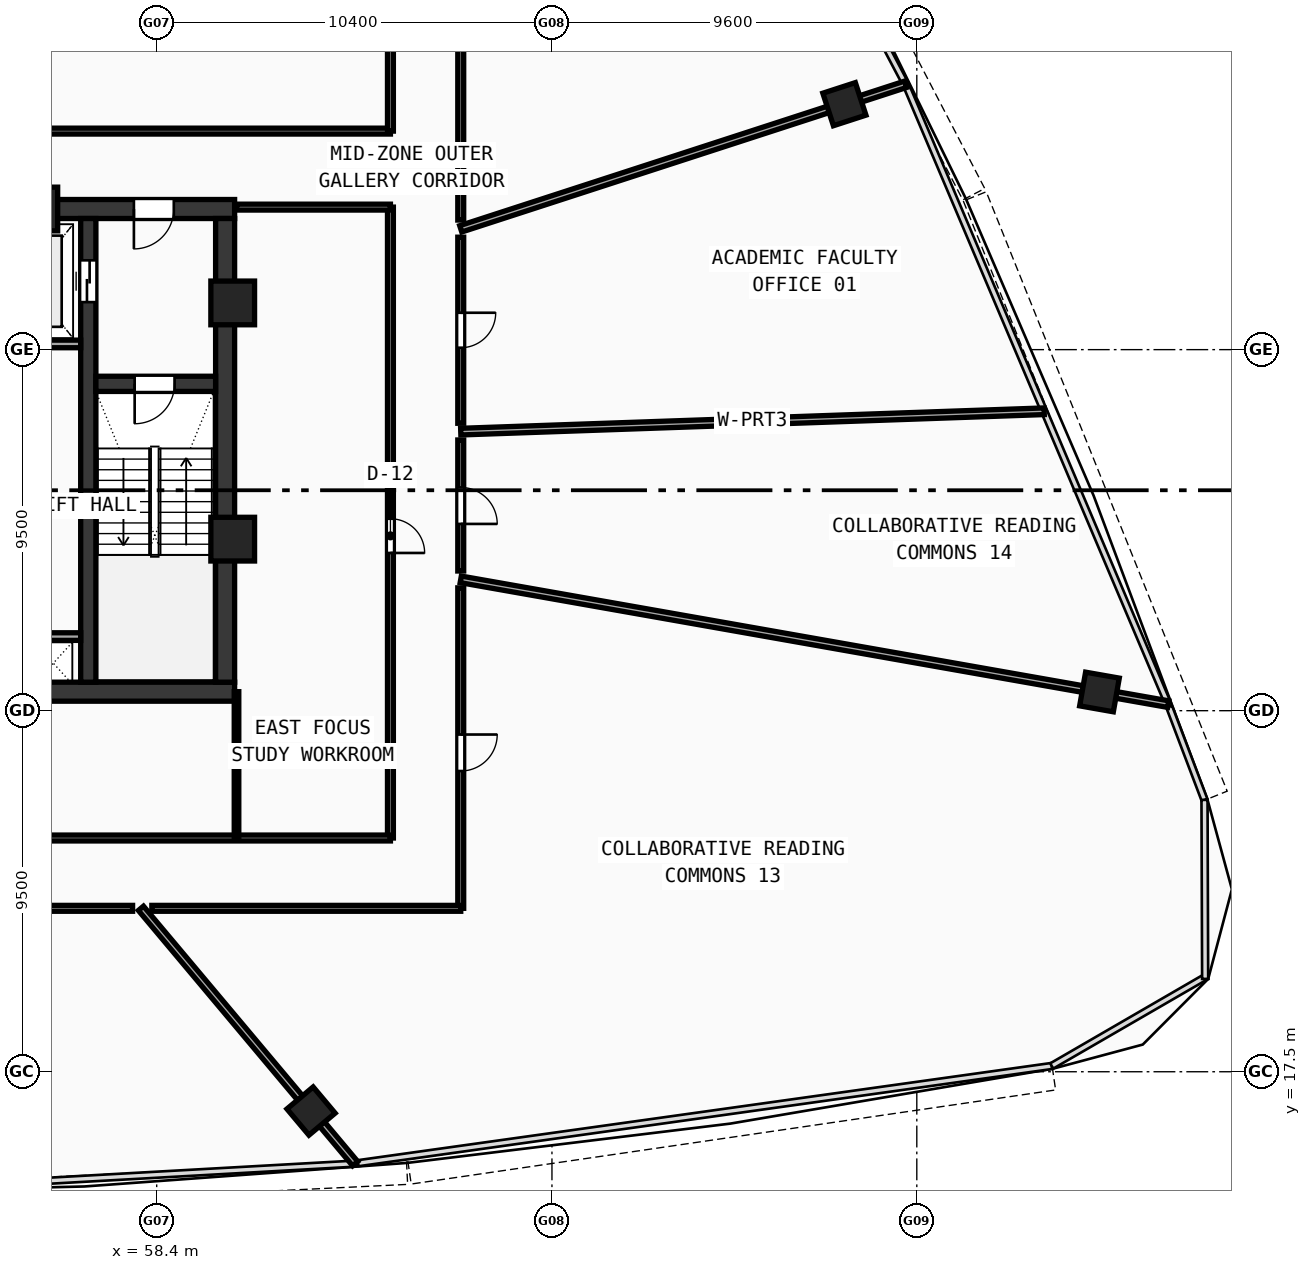
"""IFC4 building model, lengths in metres.
Left out: names, types, materials, properties, quantities, classifications, styles, units other than length and angle.
Written with IfcOpenShell. Run it as: python <this file> out.ifc"""

import sys

from ifc_helpers import new_model, si_unit, direction, frame, frame_2d, origin, origin_with_axes, origin_2d, place, context, subcontext, project, spatial, rectangle, hollow_rectangle, extrude, source, transform, mapped, element, fill, save


model = new_model("IFC4")
c1 = context("Model", 3, precision=1e-05, world=origin(), true_north=direction((0.0, 1.0)))
c2 = subcontext(c1, "Body", "Model", "MODEL_VIEW")
j1 = project(units=[si_unit("LENGTHUNIT", "METRE"), si_unit("PLANEANGLEUNIT", "RADIAN")], contexts=[c1])
p1 = place(None, origin())
s1 = spatial("IfcSite", under=j1, at=p1, CompositionType="ELEMENT")
p2 = place(p1, origin())
s2 = spatial("IfcBuilding", under=s1, at=p2, CompositionType="ELEMENT")
p3 = place(p2, frame((0.0, 0.0, 203.76)))
s3 = spatial("IfcBuildingStorey", under=s2, at=p3, CompositionType="ELEMENT", Elevation=203.76)
p4 = place(p3, frame((35.55, 27.5, 0.0), z_axis=(0.0, 0.0, 1.0), x_axis=(1.0, 0.0, 0.0)))
e1 = element("IfcWall", 1, at=p4, inside=s3, PredefinedType="SHEAR", context=c2, shape_type="SweptSolid", body=[
    extrude(rectangle(XDim=24.9, YDim=0.5, at=frame_2d((12.45, 0.0))), origin(), (0.0, 0.0, 1.0), 3.54),
])
p5 = place(p3, frame((49.2, 40.2, 0.0), z_axis=(0.0, 0.0, 1.0), x_axis=(1.0, 0.0, 0.0)))
e2 = element("IfcWall", 2, at=p5, inside=s3, PredefinedType="SHEAR", context=c2, shape_type="SweptSolid", body=[
    extrude(rectangle(XDim=11.25, YDim=0.5, at=frame_2d((5.625, 0.0))), origin(), (0.0, 0.0, 1.0), 3.54),
])
p6 = place(p5, frame((8.6, 0.0, 0.0)))
e3 = element("IfcOpeningElement", 3, at=p6, cuts=e2, PredefinedType="OPENING", context=c2, shape_type="SweptSolid", body=[
    extrude(rectangle(XDim=1.05, YDim=2.1, at=frame_2d((0.525, 1.05))), frame((0.0, 0.26, 0.0), z_axis=(0.0, -1.0, 0.0), x_axis=(1.0, 0.0, 0.0)), (0.0, 0.0, 1.0), 0.52),
])
p7 = place(p3, frame((60.2, 27.75, 0.0), z_axis=(0.0, 0.0, 1.0), x_axis=(0.0, 1.0, 0.0)))
e4 = element("IfcWall", 4, at=p7, inside=s3, PredefinedType="SHEAR", context=c2, shape_type="SweptSolid", body=[
    extrude(rectangle(XDim=12.2, YDim=0.5, at=frame_2d((6.1, 0.0))), origin(), (0.0, 0.0, 1.0), 3.54),
])
p8 = place(p3, frame((56.6, 27.75, 0.0), z_axis=(0.0, 0.0, 1.0), x_axis=(0.0, 1.0, 0.0)))
e5 = element("IfcWall", 5, at=p8, inside=s3, PredefinedType="SHEAR", context=c2, shape_type="SweptSolid", body=[
    extrude(rectangle(XDim=12.2, YDim=0.4, at=frame_2d((6.1, 0.0))), origin(), (0.0, 0.0, 1.0), 3.54),
])
p9 = place(p8, frame((10.0, 0.0, 0.0)))
e6 = element("IfcOpeningElement", 6, at=p9, cuts=e5, PredefinedType="OPENING", context=c2, shape_type="SweptSolid", body=[
    extrude(rectangle(XDim=1.1, YDim=2.1, at=frame_2d((0.55, 1.05))), frame((0.0, 0.21, 0.0), z_axis=(0.0, -1.0, 0.0), x_axis=(1.0, 0.0, 0.0)), (0.0, 0.0, 1.0), 0.42),
])
p10 = place(p3, frame((56.8, 35.6, 0.0), z_axis=(0.0, 0.0, 1.0), x_axis=(1.0, 0.0, 0.0)))
e7 = element("IfcWall", 7, at=p10, inside=s3, PredefinedType="SHEAR", context=c2, shape_type="SweptSolid", body=[
    extrude(rectangle(XDim=3.15, YDim=0.4, at=frame_2d((1.575, 0.0))), origin(), (0.0, 0.0, 1.0), 3.54),
])
p11 = place(p10, frame((1.02, 0.0, 0.0)))
e8 = element("IfcOpeningElement", 8, at=p11, cuts=e7, PredefinedType="OPENING", context=c2, shape_type="SweptSolid", body=[
    extrude(rectangle(XDim=1.05, YDim=2.1, at=frame_2d((0.525, 1.05))), frame((0.0, 0.21, 0.0), z_axis=(0.0, -1.0, 0.0), x_axis=(1.0, 0.0, 0.0)), (0.0, 0.0, 1.0), 0.42),
])
m1 = source(origin(), c2, "Body", "SweptSolid", [
    extrude(hollow_rectangle(XDim=1.15, YDim=1.15, WallThickness=0.048, at=origin_2d()), origin(), (0.0, 0.0, 1.0), 3.8),
])
for number, where, z_axis, x_axis in (
    (9, (60.4, 31.513, -0.26), (0.0, 0.0, 1.0), (1.0, 0.0, 0.0)),
    (10, (60.4, 37.729, -0.26), (0.0, 0.0, 1.0), (1.0, 0.0, 0.0)),
    (11, (55.219, 40.2, -0.26), (0.0, 0.0, 1.0), (1.0, 0.0, 0.0)),
):
    element("IfcColumn", number, at=place(p3, frame(where, z_axis=z_axis, x_axis=x_axis)), inside=s3, PredefinedType="COLUMN", context=c2, shape_type="MappedRepresentation", body=[
        mapped(m1, transform((0.0, 0.0, 0.0), scale=1.0)),
    ])
m2 = source(origin(), c2, "Body", "SweptSolid", [
    extrude(hollow_rectangle(XDim=0.9, YDim=0.9, WallThickness=0.036, at=origin_2d()), origin(), (0.0, 0.0, 1.0), 3.8),
])
for number, where, z_axis, x_axis in (
    (12, (62.461, 16.466, -0.26), (0.0, 0.0, 1.0), (0.766, 0.643, 0.0)),
    (13, (83.207, 27.492, -0.26), (0.0, 0.0, 1.0), (0.174, 0.985, 0.0)),
    (14, (76.495, 42.958, -0.26), (0.0, 0.0, 1.0), (-0.309, 0.951, 0.0)),
):
    element("IfcColumn", number, at=place(p3, frame(where, z_axis=z_axis, x_axis=x_axis)), inside=s3, PredefinedType="COLUMN", context=c2, shape_type="MappedRepresentation", body=[
        mapped(m2, transform((0.0, 0.0, 0.0), scale=1.0)),
    ])
p12 = place(p3, frame((53.68, 36.65, 0.0), z_axis=(0.0, 0.0, 1.0), x_axis=(1.0, 0.0, 0.0)))
e15 = element("IfcWall", 15, at=p12, inside=s3, PredefinedType="SOLIDWALL", context=c2, shape_type="SweptSolid", body=[
    extrude(rectangle(XDim=2.72, YDim=0.2, at=frame_2d((1.36, 0.0))), origin(), (0.0, 0.0, 1.0), 3.54),
])
p13 = place(p3, frame((55.12, 28.95, 0.0), z_axis=(0.0, 0.0, 1.0), x_axis=(1.0, 0.0, 0.0)))
e16 = element("IfcWall", 16, at=p13, inside=s3, PredefinedType="SOLIDWALL", context=c2, shape_type="SweptSolid", body=[
    extrude(rectangle(XDim=1.28, YDim=0.2, at=frame_2d((0.64, 0.0))), origin(), (0.0, 0.0, 1.0), 3.54),
])
p14 = place(p3, frame((31.45, 42.25, 0.0), z_axis=(0.0, 0.0, 1.0), x_axis=(1.0, 0.0, 0.0)))
e17 = element("IfcWall", 17, at=p14, inside=s3, PredefinedType="PARTITIONING", context=c2, shape_type="SweptSolid", body=[
    extrude(rectangle(XDim=33.1, YDim=0.155, at=frame_2d((16.55, 0.0))), origin(), (0.0, 0.0, 1.0), 2.89),
])
p15 = place(p3, frame((64.55, 42.25, 0.0), z_axis=(0.0, 0.0, 1.0), x_axis=(0.0, 1.0, 0.0)))
e18 = element("IfcWall", 18, at=p15, inside=s3, PredefinedType="PARTITIONING", context=c2, shape_type="SweptSolid", body=[
    extrude(rectangle(XDim=11.7, YDim=0.155, at=frame_2d((5.85, 0.0))), origin(), (0.0, 0.0, 1.0), 2.89),
])
p16 = place(p3, frame((64.55, 23.65, 0.0), z_axis=(0.0, 0.0, 1.0), x_axis=(0.0, 1.0, 0.0)))
e19 = element("IfcWall", 19, at=p16, inside=s3, PredefinedType="PARTITIONING", context=c2, shape_type="SweptSolid", body=[
    extrude(rectangle(XDim=16.6, YDim=0.155, at=frame_2d((8.3, 0.0))), origin(), (0.0, 0.0, 1.0), 2.89),
])
p17 = place(p16, frame((7.5, 0.0, 0.0)))
e20 = element("IfcOpeningElement", 20, at=p17, cuts=e19, PredefinedType="OPENING", context=c2, shape_type="SweptSolid", body=[
    extrude(rectangle(XDim=0.9, YDim=2.08, at=frame_2d((0.45, 1.04))), frame((0.0, 0.087, 0.0), z_axis=(0.0, -1.0, 0.0), x_axis=(1.0, 0.0, 0.0)), (0.0, 0.0, 1.0), 0.175),
])
p18 = place(p3, frame((31.45, 23.65, 0.0), z_axis=(0.0, 0.0, 1.0), x_axis=(1.0, 0.0, 0.0)))
e21 = element("IfcWall", 21, at=p18, inside=s3, PredefinedType="PARTITIONING", context=c2, shape_type="SweptSolid", body=[
    extrude(rectangle(XDim=33.1, YDim=0.155, at=frame_2d((16.55, 0.0))), origin(), (0.0, 0.0, 1.0), 2.89),
])
p19 = place(p18, frame((16.0, 0.0, 0.0)))
e22 = element("IfcOpeningElement", 22, at=p19, cuts=e21, PredefinedType="OPENING", context=c2, shape_type="SweptSolid", body=[
    extrude(rectangle(XDim=0.92, YDim=2.1, at=frame_2d((0.46, 1.05))), frame((0.0, 0.087, 0.0), z_axis=(0.0, -1.0, 0.0), x_axis=(1.0, 0.0, 0.0)), (0.0, 0.0, 1.0), 0.175),
])
p20 = place(p3, frame((60.5, 40.25, 0.0), z_axis=(0.0, 0.0, 1.0), x_axis=(1.0, 0.0, 0.0)))
e23 = element("IfcWall", 23, at=p20, inside=s3, PredefinedType="PARTITIONING", context=c2, shape_type="SweptSolid", body=[
    extrude(rectangle(XDim=4.05, YDim=0.155, at=frame_2d((2.025, 0.0))), origin(), (0.0, 0.0, 1.0), 3.54),
])
p21 = place(p3, frame((60.5, 23.65, 0.0), z_axis=(0.0, 0.0, 1.0), x_axis=(0.0, 1.0, 0.0)))
e24 = element("IfcWall", 24, at=p21, inside=s3, PredefinedType="PARTITIONING", context=c2, shape_type="SweptSolid", body=[
    extrude(rectangle(XDim=3.85, YDim=0.12, at=frame_2d((1.925, 0.0))), origin(), (0.0, 0.0, 1.0), 3.14),
])
p22 = place(p3, frame((66.4, 34.343, 0.0), z_axis=(0.0, 0.0, 1.0), x_axis=(0.999390706755, 0.034902940442, 0.0)))
e25 = element("IfcWall", 25, at=p22, inside=s3, PredefinedType="PARTITIONING", context=c2, shape_type="SweptSolid", body=[
    extrude(rectangle(XDim=15.361, YDim=0.175, at=frame_2d((7.68, 0.0))), origin(), (0.0, 0.0, 1.0), 2.89),
])
p23 = place(p3, frame((66.4, 39.678, 0.0), z_axis=(0.0, 0.0, 1.0), x_axis=(0.951057676857, 0.309013422511, 0.0)))
e26 = element("IfcWall", 26, at=p23, inside=s3, PredefinedType="PARTITIONING", context=c2, shape_type="SweptSolid", body=[
    extrude(rectangle(XDim=12.31, YDim=0.175, at=frame_2d((6.155, 0.0))), origin(), (0.0, 0.0, 1.0), 2.89),
])
p24 = place(p3, frame((57.985, 21.8, 0.0), z_axis=(0.0, 0.0, 1.0), x_axis=(0.642774108653, -0.766055771629, 0.0)))
e27 = element("IfcWall", 27, at=p24, inside=s3, PredefinedType="PARTITIONING", context=c2, shape_type="SweptSolid", body=[
    extrude(rectangle(XDim=8.769, YDim=0.175, at=frame_2d((4.385, 0.0))), origin(), (0.0, 0.0, 1.0), 2.89),
])
p25 = place(p3, frame((66.4, 30.456, 0.0), z_axis=(0.0, 0.0, 1.0), x_axis=(0.984807864876, -0.173647543254, 0.0)))
e28 = element("IfcWall", 28, at=p25, inside=s3, PredefinedType="PARTITIONING", context=c2, shape_type="SweptSolid", body=[
    extrude(rectangle(XDim=18.902, YDim=0.175, at=frame_2d((9.451, 0.0))), origin(), (0.0, 0.0, 1.0), 2.89),
])
p26 = place(p3, frame((66.4, 55.8, 0.0), z_axis=(0.0, 0.0, 1.0), x_axis=(0.0, -1.0, 0.0)))
e29 = element("IfcWall", 29, at=p26, inside=s3, PredefinedType="PARTITIONING", context=c2, shape_type="SweptSolid", body=[
    extrude(rectangle(XDim=15.89, YDim=0.155, at=frame_2d((7.945, 0.0))), origin(), (0.0, 0.0, 1.0), 2.89),
])
p27 = place(p26, frame((7.356, 0.0, 0.0)))
e30 = element("IfcOpeningElement", 30, at=p27, cuts=e29, PredefinedType="OPENING", context=c2, shape_type="SweptSolid", body=[
    extrude(rectangle(XDim=0.96, YDim=2.12, at=frame_2d((0.48, 1.06))), frame((0.0, 0.087, 0.0), z_axis=(0.0, -1.0, 0.0), x_axis=(1.0, 0.0, 0.0)), (0.0, 0.0, 1.0), 0.175),
])
p28 = place(p3, frame((66.4, 39.459, 0.0), z_axis=(0.0, 0.0, 1.0), x_axis=(0.0, -1.0, 0.0)))
e31 = element("IfcWall", 31, at=p28, inside=s3, PredefinedType="PARTITIONING", context=c2, shape_type="SweptSolid", body=[
    extrude(rectangle(XDim=4.896, YDim=0.155, at=frame_2d((2.448, 0.0))), origin(), (0.0, 0.0, 1.0), 3.14),
])
p29 = place(p28, frame((1.988, 0.0, 0.0)))
e32 = element("IfcOpeningElement", 32, at=p29, cuts=e31, PredefinedType="OPENING", context=c2, shape_type="SweptSolid", body=[
    extrude(rectangle(XDim=0.92, YDim=2.1, at=frame_2d((0.46, 1.05))), frame((0.0, 0.087, 0.0), z_axis=(0.0, -1.0, 0.0), x_axis=(1.0, 0.0, 0.0)), (0.0, 0.0, 1.0), 0.175),
])
p30 = place(p3, frame((66.4, 34.123, 0.0), z_axis=(0.0, 0.0, 1.0), x_axis=(0.0, -1.0, 0.0)))
e33 = element("IfcWall", 33, at=p30, inside=s3, PredefinedType="PARTITIONING", context=c2, shape_type="SweptSolid", body=[
    extrude(rectangle(XDim=3.448, YDim=0.155, at=frame_2d((1.724, 0.0))), origin(), (0.0, 0.0, 1.0), 3.54),
])
p31 = place(p30, frame((1.249, 0.0, 0.0)))
e34 = element("IfcOpeningElement", 34, at=p31, cuts=e33, PredefinedType="OPENING", context=c2, shape_type="SweptSolid", body=[
    extrude(rectangle(XDim=0.96, YDim=2.12, at=frame_2d((0.48, 1.06))), frame((0.0, 0.087, 0.0), z_axis=(0.0, -1.0, 0.0), x_axis=(1.0, 0.0, 0.0)), (0.0, 0.0, 1.0), 0.175),
])
p32 = place(p3, frame((66.4, 30.232, 0.0), z_axis=(0.0, 0.0, 1.0), x_axis=(0.0, -1.0, 0.0)))
e35 = element("IfcWall", 35, at=p32, inside=s3, PredefinedType="PARTITIONING", context=c2, shape_type="SweptSolid", body=[
    extrude(rectangle(XDim=8.432, YDim=0.155, at=frame_2d((4.216, 0.0))), origin(), (0.0, 0.0, 1.0), 3.14),
])
p33 = place(p32, frame((3.859, 0.0, 0.0)))
e36 = element("IfcOpeningElement", 36, at=p33, cuts=e35, PredefinedType="OPENING", context=c2, shape_type="SweptSolid", body=[
    extrude(rectangle(XDim=0.96, YDim=2.12, at=frame_2d((0.48, 1.06))), frame((0.0, 0.087, 0.0), z_axis=(0.0, -1.0, 0.0), x_axis=(1.0, 0.0, 0.0)), (0.0, 0.0, 1.0), 0.175),
])
p34 = place(p3, frame((66.4, 21.8, 0.0), z_axis=(0.0, 0.0, 1.0), x_axis=(-1.0, 0.0, 0.0)))
e37 = element("IfcWall", 37, at=p34, inside=s3, PredefinedType="PARTITIONING", context=c2, shape_type="SweptSolid", body=[
    extrude(rectangle(XDim=8.127, YDim=0.155, at=frame_2d((4.064, 0.0))), origin(), (0.0, 0.0, 1.0), 3.14),
])
p35 = place(p3, frame((57.765, 21.8, 0.0), z_axis=(0.0, 0.0, 1.0), x_axis=(-1.0, 0.0, 0.0)))
e38 = element("IfcWall", 38, at=p35, inside=s3, PredefinedType="PARTITIONING", context=c2, shape_type="SweptSolid", body=[
    extrude(rectangle(XDim=12.734, YDim=0.155, at=frame_2d((6.367, 0.0))), origin(), (0.0, 0.0, 1.0), 2.89),
])
p36 = place(p35, frame((5.892, 0.0, 0.0)))
e39 = element("IfcOpeningElement", 39, at=p36, cuts=e38, PredefinedType="OPENING", context=c2, shape_type="SweptSolid", body=[
    extrude(rectangle(XDim=0.96, YDim=2.12, at=frame_2d((0.48, 1.06))), frame((0.0, 0.087, 0.0), z_axis=(0.0, -1.0, 0.0), x_axis=(1.0, 0.0, 0.0)), (0.0, 0.0, 1.0), 0.175),
])
m3 = source(origin(), c2, "Body", "SweptSolid", [
    extrude(rectangle(XDim=1.05, YDim=2.1, at=frame_2d((0.525, 1.05))), frame((0.0, 0.025, 0.0), z_axis=(0.0, -1.0, 0.0), x_axis=(1.0, 0.0, 0.0)), (0.0, 0.0, 1.0), 0.05),
])
p37 = place(p11, frame((1.05, 0.0, 0.0), z_axis=(0.0, 0.0, 1.0), x_axis=(-1.0, 0.0, 0.0)))
e40 = element("IfcDoor", 40, at=p37, inside=s3, OperationType="SINGLE_SWING_RIGHT", PredefinedType="DOOR", context=c2, shape_type="MappedRepresentation", body=[
    mapped(m3, transform((0.0, 0.0, 0.0), scale=1.0)),
])
fill(e8, e40)
p38 = place(p6, frame((1.05, 0.0, 0.0), z_axis=(0.0, 0.0, 1.0), x_axis=(-1.0, 0.0, 0.0)))
e41 = element("IfcDoor", 41, at=p38, inside=s3, OperationType="SINGLE_SWING_RIGHT", PredefinedType="DOOR", context=c2, shape_type="MappedRepresentation", body=[
    mapped(m3, transform((0.0, 0.0, 0.0), scale=1.0)),
])
fill(e3, e41)
m4 = source(origin(), c2, "Body", "SweptSolid", [
    extrude(rectangle(XDim=1.1, YDim=2.1, at=frame_2d((0.55, 1.05))), frame((0.0, 0.025, 0.0), z_axis=(0.0, -1.0, 0.0), x_axis=(1.0, 0.0, 0.0)), (0.0, 0.0, 1.0), 0.05),
])
p39 = place(p9, origin_with_axes())
e42 = element("IfcDoor", 42, at=p39, inside=s3, OperationType="DOUBLE_DOOR_SLIDING", PredefinedType="DOOR", context=c2, shape_type="MappedRepresentation", body=[
    mapped(m4, transform((0.0, 0.0, 0.0), scale=1.0)),
])
fill(e6, e42)
m5 = source(origin(), c2, "Body", "SweptSolid", [
    extrude(rectangle(XDim=0.9, YDim=2.08, at=frame_2d((0.45, 1.04))), frame((0.0, 0.025, 0.0), z_axis=(0.0, -1.0, 0.0), x_axis=(1.0, 0.0, 0.0)), (0.0, 0.0, 1.0), 0.05),
])
p40 = place(p17, frame((0.9, 0.0, 0.0), z_axis=(0.0, 0.0, 1.0), x_axis=(-1.0, 0.0, 0.0)))
e43 = element("IfcDoor", 43, at=p40, inside=s3, OperationType="SINGLE_SWING_RIGHT", PredefinedType="DOOR", context=c2, shape_type="MappedRepresentation", body=[
    mapped(m5, transform((0.0, 0.0, 0.0), scale=1.0)),
])
fill(e20, e43)
m6 = source(origin(), c2, "Body", "SweptSolid", [
    extrude(rectangle(XDim=0.92, YDim=2.1, at=frame_2d((0.46, 1.05))), frame((0.0, 0.025, 0.0), z_axis=(0.0, -1.0, 0.0), x_axis=(1.0, 0.0, 0.0)), (0.0, 0.0, 1.0), 0.05),
])
p41 = place(p29, origin_with_axes())
e44 = element("IfcDoor", 44, at=p41, inside=s3, OperationType="SINGLE_SWING_LEFT", PredefinedType="DOOR", context=c2, shape_type="MappedRepresentation", body=[
    mapped(m6, transform((0.0, 0.0, 0.0), scale=1.0)),
])
fill(e32, e44)
m7 = source(origin(), c2, "Body", "SweptSolid", [
    extrude(rectangle(XDim=0.96, YDim=2.12, at=frame_2d((0.48, 1.06))), frame((0.0, 0.025, 0.0), z_axis=(0.0, -1.0, 0.0), x_axis=(1.0, 0.0, 0.0)), (0.0, 0.0, 1.0), 0.05),
])
p42 = place(p33, origin_with_axes())
e45 = element("IfcDoor", 45, at=p42, inside=s3, OperationType="SINGLE_SWING_LEFT", PredefinedType="DOOR", context=c2, shape_type="MappedRepresentation", body=[
    mapped(m7, transform((0.0, 0.0, 0.0), scale=1.0)),
])
fill(e36, e45)
p43 = place(p31, origin_with_axes())
e46 = element("IfcDoor", 46, at=p43, inside=s3, OperationType="SINGLE_SWING_RIGHT", PredefinedType="DOOR", context=c2, shape_type="MappedRepresentation", body=[
    mapped(m7, transform((0.0, 0.0, 0.0), scale=1.0)),
])
fill(e34, e46)
save(model, sys.argv[1])
